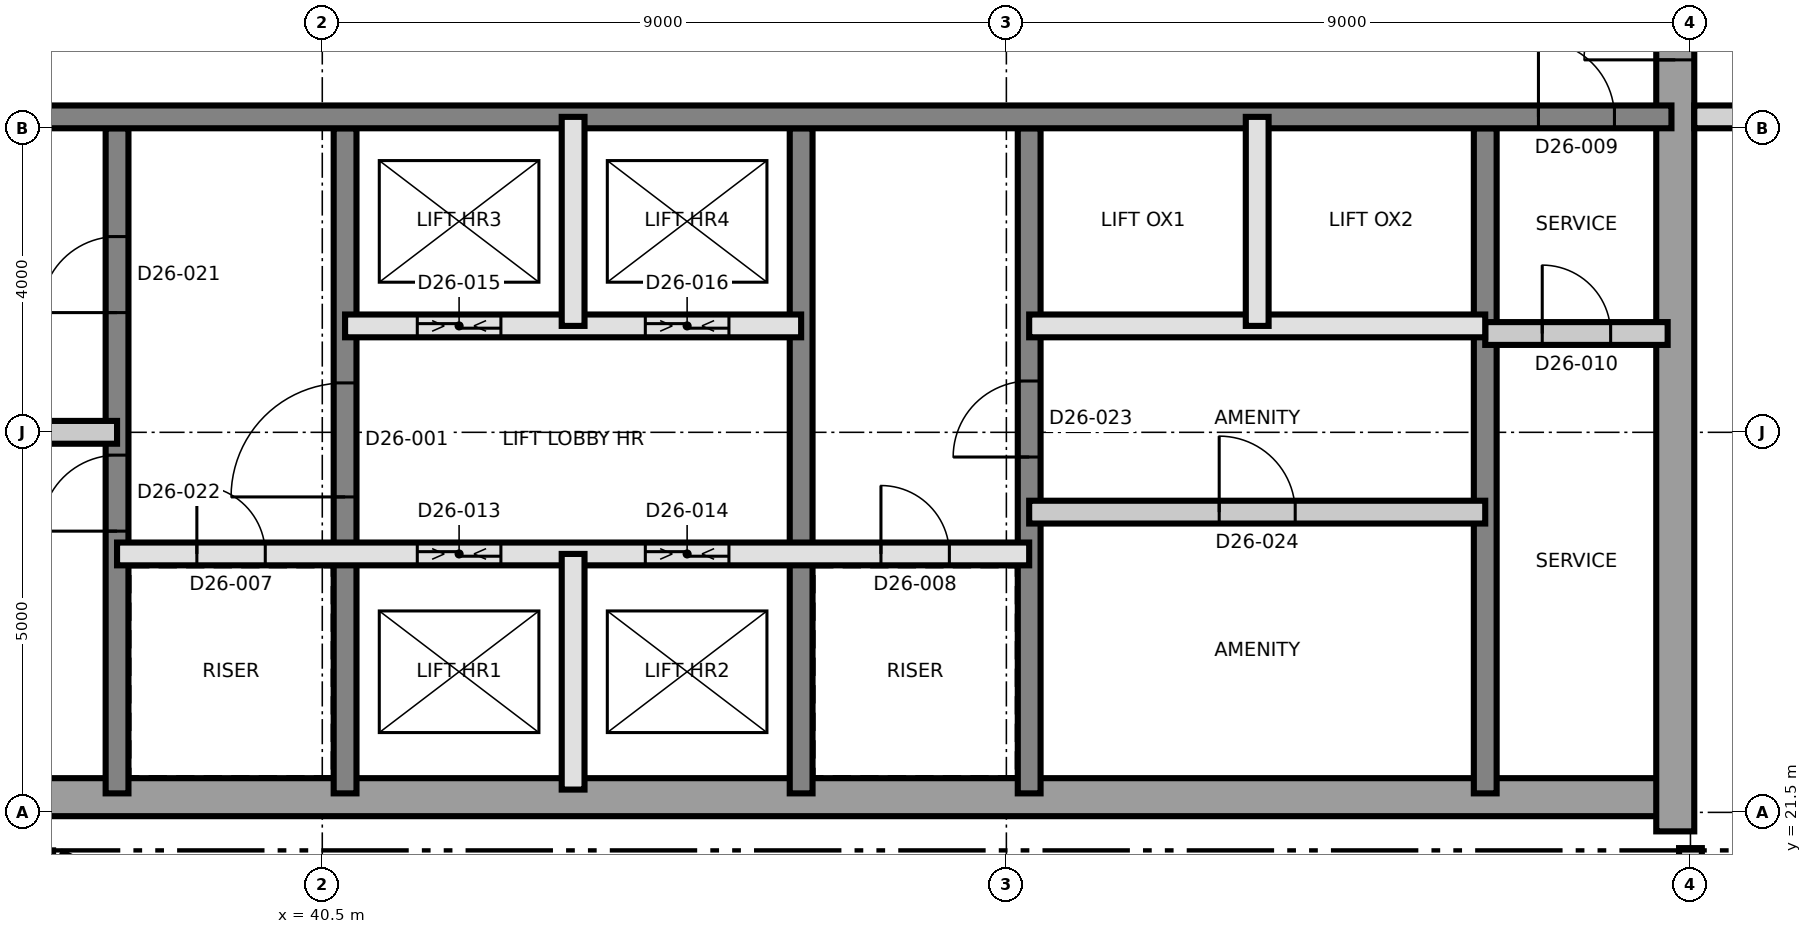
"""IFC4 building model, lengths in metres.
Left out: names, types, materials, properties, quantities, classifications, styles, units other than length and angle.
Written with IfcOpenShell. Run it as: python <this file> out.ifc"""

import sys

from ifc_helpers import new_model, si_unit, direction, frame, frame_2d, origin, place, context, subcontext, project, spatial, rectangle, extrude, element, fill, save


model = new_model("IFC4")
c1 = context("Model", 3, precision=1e-05, world=origin(), true_north=direction((0.0, 1.0)))
c2 = subcontext(c1, "Body", "Model", "MODEL_VIEW")
j1 = project(units=[si_unit("LENGTHUNIT", "METRE"), si_unit("PLANEANGLEUNIT", "RADIAN")], contexts=[c1])
p1 = place(None, origin())
s1 = spatial("IfcSite", under=j1, at=p1, CompositionType="ELEMENT")
p2 = place(p1, origin())
s2 = spatial("IfcBuilding", under=s1, at=p2, CompositionType="ELEMENT")
p3 = place(p2, frame((0.0, 0.0, 240.2)))
s3 = spatial("IfcBuildingStorey", under=s2, at=p3, CompositionType="ELEMENT", Elevation=240.2)
p4 = place(p3, frame((31.25, 21.7, 0.0), z_axis=(0.0, 0.0, 1.0), x_axis=(1.0, 0.0, 0.0)))
e1 = element("IfcWall", 1, at=p4, inside=s3, PredefinedType="SHEAR", context=c2, shape_type="SweptSolid", body=[
    extrude(rectangle(XDim=27.0, YDim=0.5, at=frame_2d((13.5, 0.0))), origin(), (0.0, 0.0, 1.0), 3.7),
])
p5 = place(p3, frame((58.3, 21.25, 0.0), z_axis=(0.0, 0.0, 1.0), x_axis=(0.0, 1.0, 0.0)))
e2 = element("IfcWall", 2, at=p5, inside=s3, PredefinedType="SHEAR", context=c2, shape_type="SweptSolid", body=[
    extrude(rectangle(XDim=18.5, YDim=0.5, at=frame_2d((9.25, 0.0))), origin(), (0.0, 0.0, 1.0), 3.7),
])
p6 = place(p5, frame((10.15, 0.0, 0.0)))
e3 = element("IfcOpeningElement", 3, at=p6, cuts=e2, PredefinedType="OPENING", context=c2, shape_type="SweptSolid", body=[
    extrude(rectangle(XDim=1.2, YDim=2.1, at=frame_2d((0.6, 1.05))), frame((0.0, 0.26, 0.0), z_axis=(0.0, -1.0, 0.0), x_axis=(1.0, 0.0, 0.0)), (0.0, 0.0, 1.0), 0.52),
])
p7 = place(p3, frame((37.8, 21.75, 0.0), z_axis=(0.0, 0.0, 1.0), x_axis=(0.0, 1.0, 0.0)))
e4 = element("IfcWall", 4, at=p7, inside=s3, PredefinedType="SHEAR", context=c2, shape_type="SweptSolid", body=[
    extrude(rectangle(XDim=8.75, YDim=0.3, at=frame_2d((4.375, 0.0))), origin(), (0.0, 0.0, 1.0), 3.7),
])
p8 = place(p7, frame((6.325, 0.0, 0.0)))
e5 = element("IfcOpeningElement", 5, at=p8, cuts=e4, PredefinedType="OPENING", context=c2, shape_type="SweptSolid", body=[
    extrude(rectangle(XDim=1.0, YDim=2.1, at=frame_2d((0.5, 1.05))), frame((0.0, 0.16, 0.0), z_axis=(0.0, -1.0, 0.0), x_axis=(1.0, 0.0, 0.0)), (0.0, 0.0, 1.0), 0.32),
])
p9 = place(p7, frame((3.45, 0.0, 0.0)))
e6 = element("IfcOpeningElement", 6, at=p9, cuts=e4, PredefinedType="OPENING", context=c2, shape_type="SweptSolid", body=[
    extrude(rectangle(XDim=1.0, YDim=2.1, at=frame_2d((0.5, 1.05))), frame((0.0, 0.16, 0.0), z_axis=(0.0, -1.0, 0.0), x_axis=(1.0, 0.0, 0.0)), (0.0, 0.0, 1.0), 0.32),
])
p10 = place(p3, frame((40.8, 21.75, 0.0), z_axis=(0.0, 0.0, 1.0), x_axis=(0.0, 1.0, 0.0)))
e7 = element("IfcWall", 7, at=p10, inside=s3, PredefinedType="SHEAR", context=c2, shape_type="SweptSolid", body=[
    extrude(rectangle(XDim=8.75, YDim=0.3, at=frame_2d((4.375, 0.0))), origin(), (0.0, 0.0, 1.0), 3.7),
])
p11 = place(p10, frame((3.9, 0.0, 0.0)))
e8 = element("IfcOpeningElement", 8, at=p11, cuts=e7, PredefinedType="OPENING", context=c2, shape_type="SweptSolid", body=[
    extrude(rectangle(XDim=1.5, YDim=2.1, at=frame_2d((0.75, 1.05))), frame((0.0, 0.16, 0.0), z_axis=(0.0, -1.0, 0.0), x_axis=(1.0, 0.0, 0.0)), (0.0, 0.0, 1.0), 0.32),
])
p12 = place(p3, frame((46.8, 21.75, 0.0), z_axis=(0.0, 0.0, 1.0), x_axis=(0.0, 1.0, 0.0)))
e9 = element("IfcWall", 9, at=p12, inside=s3, PredefinedType="SHEAR", context=c2, shape_type="SweptSolid", body=[
    extrude(rectangle(XDim=8.75, YDim=0.3, at=frame_2d((4.375, 0.0))), origin(), (0.0, 0.0, 1.0), 3.7),
])
p13 = place(p3, frame((49.8, 21.75, 0.0), z_axis=(0.0, 0.0, 1.0), x_axis=(0.0, 1.0, 0.0)))
e10 = element("IfcWall", 10, at=p13, inside=s3, PredefinedType="SHEAR", context=c2, shape_type="SweptSolid", body=[
    extrude(rectangle(XDim=8.75, YDim=0.3, at=frame_2d((4.375, 0.0))), origin(), (0.0, 0.0, 1.0), 3.7),
])
p14 = place(p13, frame((4.425, 0.0, 0.0)))
e11 = element("IfcOpeningElement", 11, at=p14, cuts=e10, PredefinedType="OPENING", context=c2, shape_type="SweptSolid", body=[
    extrude(rectangle(XDim=1.0, YDim=2.1, at=frame_2d((0.5, 1.05))), frame((0.0, 0.16, 0.0), z_axis=(0.0, -1.0, 0.0), x_axis=(1.0, 0.0, 0.0)), (0.0, 0.0, 1.0), 0.32),
])
p15 = place(p3, frame((55.8, 21.75, 0.0), z_axis=(0.0, 0.0, 1.0), x_axis=(0.0, 1.0, 0.0)))
e12 = element("IfcWall", 12, at=p15, inside=s3, PredefinedType="SHEAR", context=c2, shape_type="SweptSolid", body=[
    extrude(rectangle(XDim=8.75, YDim=0.3, at=frame_2d((4.375, 0.0))), origin(), (0.0, 0.0, 1.0), 3.7),
])
p16 = place(p3, frame((31.75, 30.65, 0.0), z_axis=(0.0, 0.0, 1.0), x_axis=(1.0, 0.0, 0.0)))
e13 = element("IfcWall", 13, at=p16, inside=s3, PredefinedType="SHEAR", context=c2, shape_type="SweptSolid", body=[
    extrude(rectangle(XDim=26.5, YDim=0.3, at=frame_2d((13.25, 0.0))), origin(), (0.0, 0.0, 1.0), 3.7),
])
p17 = place(p16, frame((24.75, 0.0, 0.0)))
e14 = element("IfcOpeningElement", 14, at=p17, cuts=e13, PredefinedType="OPENING", context=c2, shape_type="SweptSolid", body=[
    extrude(rectangle(XDim=1.0, YDim=2.1, at=frame_2d((0.5, 1.05))), frame((0.0, 0.16, 0.0), z_axis=(0.0, -1.0, 0.0), x_axis=(1.0, 0.0, 0.0)), (0.0, 0.0, 1.0), 0.32),
])
p18 = place(p3, frame((31.36, 20.85, 0.0), z_axis=(0.0, 0.0, 1.0), x_axis=(1.0, 0.0, 0.0)))
e15 = element("IfcWall", 15, at=p18, inside=s3, PredefinedType="SOLIDWALL", context=c2, shape_type="SweptSolid", body=[
    extrude(rectangle(XDim=5.599, YDim=0.3, at=frame_2d((2.8, 0.0))), origin(), (0.0, 0.0, 1.0), 3.4),
])
p19 = place(p3, frame((37.025, 20.834, 0.0), z_axis=(0.0, 0.0, 1.0), x_axis=(0.896925860522, -0.442180959254, 0.0)))
e16 = element("IfcWall", 16, at=p19, inside=s3, PredefinedType="SOLIDWALL", context=c2, shape_type="SweptSolid", body=[
    extrude(rectangle(XDim=1.399, YDim=0.3, at=frame_2d((0.7, 0.0))), origin(), (0.0, 0.0, 1.0), 3.4),
])
p20 = place(p3, frame((37.8, 24.9, 0.0), z_axis=(0.0, 0.0, 1.0), x_axis=(1.0, 0.0, 0.0)))
e17 = element("IfcWall", 17, at=p20, inside=s3, PredefinedType="SOLIDWALL", context=c2, shape_type="SweptSolid", body=[
    extrude(rectangle(XDim=12.0, YDim=0.3, at=frame_2d((6.0, 0.0))), origin(), (0.0, 0.0, 1.0), 3.4),
])
p21 = place(p20, frame((1.05, 0.0, 0.0)))
e18 = element("IfcOpeningElement", 18, at=p21, cuts=e17, PredefinedType="OPENING", context=c2, shape_type="SweptSolid", body=[
    extrude(rectangle(XDim=0.9, YDim=2.1, at=frame_2d((0.45, 1.05))), frame((0.0, 0.16, 0.0), z_axis=(0.0, -1.0, 0.0), x_axis=(1.0, 0.0, 0.0)), (0.0, 0.0, 1.0), 0.32),
])
p22 = place(p20, frame((10.05, 0.0, 0.0)))
e19 = element("IfcOpeningElement", 19, at=p22, cuts=e17, PredefinedType="OPENING", context=c2, shape_type="SweptSolid", body=[
    extrude(rectangle(XDim=0.9, YDim=2.1, at=frame_2d((0.45, 1.05))), frame((0.0, 0.16, 0.0), z_axis=(0.0, -1.0, 0.0), x_axis=(1.0, 0.0, 0.0)), (0.0, 0.0, 1.0), 0.32),
])
p23 = place(p20, frame((3.95, 0.0, 0.0)))
e20 = element("IfcOpeningElement", 20, at=p23, cuts=e17, PredefinedType="OPENING", context=c2, shape_type="SweptSolid", body=[
    extrude(rectangle(XDim=1.1, YDim=2.4, at=frame_2d((0.55, 1.2))), frame((0.0, 0.16, 0.0), z_axis=(0.0, -1.0, 0.0), x_axis=(1.0, 0.0, 0.0)), (0.0, 0.0, 1.0), 0.32),
])
p24 = place(p20, frame((6.95, 0.0, 0.0)))
e21 = element("IfcOpeningElement", 21, at=p24, cuts=e17, PredefinedType="OPENING", context=c2, shape_type="SweptSolid", body=[
    extrude(rectangle(XDim=1.1, YDim=2.4, at=frame_2d((0.55, 1.2))), frame((0.0, 0.16, 0.0), z_axis=(0.0, -1.0, 0.0), x_axis=(1.0, 0.0, 0.0)), (0.0, 0.0, 1.0), 0.32),
])
p25 = place(p3, frame((49.8, 25.45, 0.0), z_axis=(0.0, 0.0, 1.0), x_axis=(1.0, 0.0, 0.0)))
e22 = element("IfcWall", 22, at=p25, inside=s3, PredefinedType="PARTITIONING", context=c2, shape_type="SweptSolid", body=[
    extrude(rectangle(XDim=6.0, YDim=0.3, at=frame_2d((3.0, 0.0))), origin(), (0.0, 0.0, 1.0), 3.4),
])
p26 = place(p25, frame((2.5, 0.0, 0.0)))
e23 = element("IfcOpeningElement", 23, at=p26, cuts=e22, PredefinedType="OPENING", context=c2, shape_type="SweptSolid", body=[
    extrude(rectangle(XDim=1.0, YDim=2.1, at=frame_2d((0.5, 1.05))), frame((0.0, 0.16, 0.0), z_axis=(0.0, -1.0, 0.0), x_axis=(1.0, 0.0, 0.0)), (0.0, 0.0, 1.0), 0.32),
])
p27 = place(p3, frame((31.8, 26.5, 0.0), z_axis=(0.0, 0.0, 1.0), x_axis=(1.0, 0.0, 0.0)))
e24 = element("IfcWall", 24, at=p27, inside=s3, PredefinedType="PARTITIONING", context=c2, shape_type="SweptSolid", body=[
    extrude(rectangle(XDim=6.0, YDim=0.3, at=frame_2d((3.0, 0.0))), origin(), (0.0, 0.0, 1.0), 3.4),
])
p28 = place(p3, frame((55.8, 27.8, 0.0), z_axis=(0.0, 0.0, 1.0), x_axis=(1.0, 0.0, 0.0)))
e25 = element("IfcWall", 25, at=p28, inside=s3, PredefinedType="PARTITIONING", context=c2, shape_type="SweptSolid", body=[
    extrude(rectangle(XDim=2.4, YDim=0.3, at=frame_2d((1.2, 0.0))), origin(), (0.0, 0.0, 1.0), 3.4),
])
p29 = place(p28, frame((0.75, 0.0, 0.0)))
e26 = element("IfcOpeningElement", 26, at=p29, cuts=e25, PredefinedType="OPENING", context=c2, shape_type="SweptSolid", body=[
    extrude(rectangle(XDim=0.9, YDim=2.1, at=frame_2d((0.45, 1.05))), frame((0.0, 0.16, 0.0), z_axis=(0.0, -1.0, 0.0), x_axis=(1.0, 0.0, 0.0)), (0.0, 0.0, 1.0), 0.32),
])
p30 = place(p3, frame((40.8, 27.9, 0.0), z_axis=(0.0, 0.0, 1.0), x_axis=(1.0, 0.0, 0.0)))
e27 = element("IfcWall", 27, at=p30, inside=s3, PredefinedType="SOLIDWALL", context=c2, shape_type="SweptSolid", body=[
    extrude(rectangle(XDim=6.0, YDim=0.3, at=frame_2d((3.0, 0.0))), origin(), (0.0, 0.0, 1.0), 3.4),
])
p31 = place(p30, frame((0.95, 0.0, 0.0)))
e28 = element("IfcOpeningElement", 28, at=p31, cuts=e27, PredefinedType="OPENING", context=c2, shape_type="SweptSolid", body=[
    extrude(rectangle(XDim=1.1, YDim=2.4, at=frame_2d((0.55, 1.2))), frame((0.0, 0.16, 0.0), z_axis=(0.0, -1.0, 0.0), x_axis=(1.0, 0.0, 0.0)), (0.0, 0.0, 1.0), 0.32),
])
p32 = place(p30, frame((3.95, 0.0, 0.0)))
e29 = element("IfcOpeningElement", 29, at=p32, cuts=e27, PredefinedType="OPENING", context=c2, shape_type="SweptSolid", body=[
    extrude(rectangle(XDim=1.1, YDim=2.4, at=frame_2d((0.55, 1.2))), frame((0.0, 0.16, 0.0), z_axis=(0.0, -1.0, 0.0), x_axis=(1.0, 0.0, 0.0)), (0.0, 0.0, 1.0), 0.32),
])
p33 = place(p3, frame((49.8, 27.9, 0.0), z_axis=(0.0, 0.0, 1.0), x_axis=(1.0, 0.0, 0.0)))
e30 = element("IfcWall", 30, at=p33, inside=s3, PredefinedType="SOLIDWALL", context=c2, shape_type="SweptSolid", body=[
    extrude(rectangle(XDim=6.0, YDim=0.3, at=frame_2d((3.0, 0.0))), origin(), (0.0, 0.0, 1.0), 3.4),
])
p34 = place(p3, frame((43.8, 21.8, 0.0), z_axis=(0.0, 0.0, 1.0), x_axis=(0.0, 1.0, 0.0)))
e31 = element("IfcWall", 31, at=p34, inside=s3, PredefinedType="SOLIDWALL", context=c2, shape_type="SweptSolid", body=[
    extrude(rectangle(XDim=3.1, YDim=0.3, at=frame_2d((1.55, 0.0))), origin(), (0.0, 0.0, 1.0), 3.4),
])
for number, where, z_axis, x_axis in (
    (32, (43.8, 27.9, 0.0), (0.0, 0.0, 1.0), (0.0, 1.0, 0.0)),
    (33, (52.8, 27.9, 0.0), (0.0, 0.0, 1.0), (0.0, 1.0, 0.0)),
):
    element("IfcWall", number, at=place(p3, frame(where, z_axis=z_axis, x_axis=x_axis)), inside=s3, PredefinedType="SOLIDWALL", context=c2, shape_type="SweptSolid", body=[
        extrude(rectangle(XDim=2.75, YDim=0.3, at=frame_2d((1.375, 0.0))), origin(), (0.0, 0.0, 1.0), 3.4),
    ])
p35 = place(p3, frame((58.55, 30.65, 0.0), z_axis=(0.0, 0.0, 1.0), x_axis=(1.0, 0.0, 0.0)))
e34 = element("IfcWall", 34, at=p35, inside=s3, PredefinedType="PARTITIONING", context=c2, shape_type="SweptSolid", body=[
    extrude(rectangle(XDim=26.78, YDim=0.3, at=frame_2d((13.39, 0.0))), origin(), (0.0, 0.0, 1.0), 3.4),
])
p36 = place(p35, frame((1.085, 0.0, 0.0)))
e35 = element("IfcOpeningElement", 35, at=p36, cuts=e34, PredefinedType="OPENING", context=c2, shape_type="SweptSolid", body=[
    extrude(rectangle(XDim=1.2, YDim=2.1, at=frame_2d((0.6, 1.05))), frame((0.0, 0.16, 0.0), z_axis=(0.0, -1.0, 0.0), x_axis=(1.0, 0.0, 0.0)), (0.0, 0.0, 1.0), 0.32),
])
p37 = place(p35, frame((4.335, 0.0, 0.0)))
e36 = element("IfcOpeningElement", 36, at=p37, cuts=e34, PredefinedType="OPENING", context=c2, shape_type="SweptSolid", body=[
    extrude(rectangle(XDim=1.0, YDim=2.1, at=frame_2d((0.5, 1.05))), frame((0.0, 0.16, 0.0), z_axis=(0.0, -1.0, 0.0), x_axis=(1.0, 0.0, 0.0)), (0.0, 0.0, 1.0), 0.32),
])
p38 = place(p35, frame((14.6, 0.0, 0.0)))
e37 = element("IfcOpeningElement", 37, at=p38, cuts=e34, PredefinedType="OPENING", context=c2, shape_type="SweptSolid", body=[
    extrude(rectangle(XDim=1.0, YDim=2.4, at=frame_2d((0.5, 1.2))), frame((0.0, 0.16, 0.0), z_axis=(0.0, -1.0, 0.0), x_axis=(1.0, 0.0, 0.0)), (0.0, 0.0, 1.0), 0.32),
])
p39 = place(p35, frame((20.3, 0.0, 0.0)))
e38 = element("IfcOpeningElement", 38, at=p39, cuts=e34, PredefinedType="OPENING", context=c2, shape_type="SweptSolid", body=[
    extrude(rectangle(XDim=1.0, YDim=2.4, at=frame_2d((0.5, 1.2))), frame((0.0, 0.16, 0.0), z_axis=(0.0, -1.0, 0.0), x_axis=(1.0, 0.0, 0.0)), (0.0, 0.0, 1.0), 0.32),
])
p40 = place(p3, frame((58.5, 19.275, 0.0), z_axis=(0.0, 0.0, 1.0), x_axis=(0.0, 1.0, 0.0)))
e39 = element("IfcWall", 39, at=p40, inside=s3, PredefinedType="PARTITIONING", context=c2, shape_type="SweptSolid", body=[
    extrude(rectangle(XDim=1.755, YDim=0.3, at=frame_2d((0.877, 0.0))), origin(), (0.0, 0.0, 1.0), 3.35),
])
p41 = place(p11, origin())
e40 = element("IfcDoor", 40, at=p41, inside=s3, OperationType="SINGLE_SWING_RIGHT", PredefinedType="DOOR", context=c2, shape_type="SweptSolid", body=[
    extrude(rectangle(XDim=1.5, YDim=2.1, at=frame_2d((0.75, 1.05))), frame((0.0, 0.025, 0.0), z_axis=(0.0, -1.0, 0.0), x_axis=(1.0, 0.0, 0.0)), (0.0, 0.0, 1.0), 0.05),
])
fill(e8, e40)
p42 = place(p21, origin())
e41 = element("IfcDoor", 41, at=p42, inside=s3, OperationType="SINGLE_SWING_LEFT", PredefinedType="DOOR", context=c2, shape_type="SweptSolid", body=[
    extrude(rectangle(XDim=0.9, YDim=2.1, at=frame_2d((0.45, 1.05))), frame((0.0, 0.025, 0.0), z_axis=(0.0, -1.0, 0.0), x_axis=(1.0, 0.0, 0.0)), (0.0, 0.0, 1.0), 0.05),
])
fill(e18, e41)
p43 = place(p22, origin())
e42 = element("IfcDoor", 42, at=p43, inside=s3, OperationType="SINGLE_SWING_RIGHT", PredefinedType="DOOR", context=c2, shape_type="SweptSolid", body=[
    extrude(rectangle(XDim=0.9, YDim=2.1, at=frame_2d((0.45, 1.05))), frame((0.0, 0.025, 0.0), z_axis=(0.0, -1.0, 0.0), x_axis=(1.0, 0.0, 0.0)), (0.0, 0.0, 1.0), 0.05),
])
fill(e19, e42)
p44 = place(p17, origin())
e43 = element("IfcDoor", 43, at=p44, inside=s3, OperationType="SINGLE_SWING_LEFT", PredefinedType="DOOR", context=c2, shape_type="SweptSolid", body=[
    extrude(rectangle(XDim=1.0, YDim=2.1, at=frame_2d((0.5, 1.05))), frame((0.0, 0.025, 0.0), z_axis=(0.0, -1.0, 0.0), x_axis=(1.0, 0.0, 0.0)), (0.0, 0.0, 1.0), 0.05),
])
fill(e14, e43)
p45 = place(p29, origin())
e44 = element("IfcDoor", 44, at=p45, inside=s3, OperationType="SINGLE_SWING_RIGHT", PredefinedType="DOOR", context=c2, shape_type="SweptSolid", body=[
    extrude(rectangle(XDim=0.9, YDim=2.1, at=frame_2d((0.45, 1.05))), frame((0.0, 0.025, 0.0), z_axis=(0.0, -1.0, 0.0), x_axis=(1.0, 0.0, 0.0)), (0.0, 0.0, 1.0), 0.05),
])
fill(e26, e44)
p46 = place(p6, origin())
e45 = element("IfcDoor", 45, at=p46, inside=s3, OperationType="SINGLE_SWING_LEFT", PredefinedType="DOOR", context=c2, shape_type="SweptSolid", body=[
    extrude(rectangle(XDim=1.2, YDim=2.1, at=frame_2d((0.6, 1.05))), frame((0.0, 0.025, 0.0), z_axis=(0.0, -1.0, 0.0), x_axis=(1.0, 0.0, 0.0)), (0.0, 0.0, 1.0), 0.05),
])
fill(e3, e45)
p47 = place(p23, origin())
e46 = element("IfcDoor", 46, at=p47, inside=s3, OperationType="SLIDING_TO_LEFT", PredefinedType="DOOR", context=c2, shape_type="SweptSolid", body=[
    extrude(rectangle(XDim=1.1, YDim=2.4, at=frame_2d((0.55, 1.2))), frame((0.0, 0.025, 0.0), z_axis=(0.0, -1.0, 0.0), x_axis=(1.0, 0.0, 0.0)), (0.0, 0.0, 1.0), 0.05),
])
fill(e20, e46)
p48 = place(p24, origin())
e47 = element("IfcDoor", 47, at=p48, inside=s3, OperationType="SLIDING_TO_LEFT", PredefinedType="DOOR", context=c2, shape_type="SweptSolid", body=[
    extrude(rectangle(XDim=1.1, YDim=2.4, at=frame_2d((0.55, 1.2))), frame((0.0, 0.025, 0.0), z_axis=(0.0, -1.0, 0.0), x_axis=(1.0, 0.0, 0.0)), (0.0, 0.0, 1.0), 0.05),
])
fill(e21, e47)
p49 = place(p31, origin())
e48 = element("IfcDoor", 48, at=p49, inside=s3, OperationType="SLIDING_TO_LEFT", PredefinedType="DOOR", context=c2, shape_type="SweptSolid", body=[
    extrude(rectangle(XDim=1.1, YDim=2.4, at=frame_2d((0.55, 1.2))), frame((0.0, 0.025, 0.0), z_axis=(0.0, -1.0, 0.0), x_axis=(1.0, 0.0, 0.0)), (0.0, 0.0, 1.0), 0.05),
])
fill(e28, e48)
p50 = place(p32, origin())
e49 = element("IfcDoor", 49, at=p50, inside=s3, OperationType="SLIDING_TO_LEFT", PredefinedType="DOOR", context=c2, shape_type="SweptSolid", body=[
    extrude(rectangle(XDim=1.1, YDim=2.4, at=frame_2d((0.55, 1.2))), frame((0.0, 0.025, 0.0), z_axis=(0.0, -1.0, 0.0), x_axis=(1.0, 0.0, 0.0)), (0.0, 0.0, 1.0), 0.05),
])
fill(e29, e49)
p51 = place(p8, origin())
e50 = element("IfcDoor", 50, at=p51, inside=s3, OperationType="SINGLE_SWING_LEFT", PredefinedType="DOOR", context=c2, shape_type="SweptSolid", body=[
    extrude(rectangle(XDim=1.0, YDim=2.1, at=frame_2d((0.5, 1.05))), frame((0.0, 0.025, 0.0), z_axis=(0.0, -1.0, 0.0), x_axis=(1.0, 0.0, 0.0)), (0.0, 0.0, 1.0), 0.05),
])
fill(e5, e50)
p52 = place(p9, origin())
e51 = element("IfcDoor", 51, at=p52, inside=s3, OperationType="SINGLE_SWING_RIGHT", PredefinedType="DOOR", context=c2, shape_type="SweptSolid", body=[
    extrude(rectangle(XDim=1.0, YDim=2.1, at=frame_2d((0.5, 1.05))), frame((0.0, 0.025, 0.0), z_axis=(0.0, -1.0, 0.0), x_axis=(1.0, 0.0, 0.0)), (0.0, 0.0, 1.0), 0.05),
])
fill(e6, e51)
p53 = place(p14, origin())
e52 = element("IfcDoor", 52, at=p53, inside=s3, OperationType="SINGLE_SWING_LEFT", PredefinedType="DOOR", context=c2, shape_type="SweptSolid", body=[
    extrude(rectangle(XDim=1.0, YDim=2.1, at=frame_2d((0.5, 1.05))), frame((0.0, 0.025, 0.0), z_axis=(0.0, -1.0, 0.0), x_axis=(1.0, 0.0, 0.0)), (0.0, 0.0, 1.0), 0.05),
])
fill(e11, e52)
p54 = place(p26, origin())
e53 = element("IfcDoor", 53, at=p54, inside=s3, OperationType="SINGLE_SWING_RIGHT", PredefinedType="DOOR", context=c2, shape_type="SweptSolid", body=[
    extrude(rectangle(XDim=1.0, YDim=2.1, at=frame_2d((0.5, 1.05))), frame((0.0, 0.025, 0.0), z_axis=(0.0, -1.0, 0.0), x_axis=(1.0, 0.0, 0.0)), (0.0, 0.0, 1.0), 0.05),
])
fill(e23, e53)
save(model, sys.argv[1])
